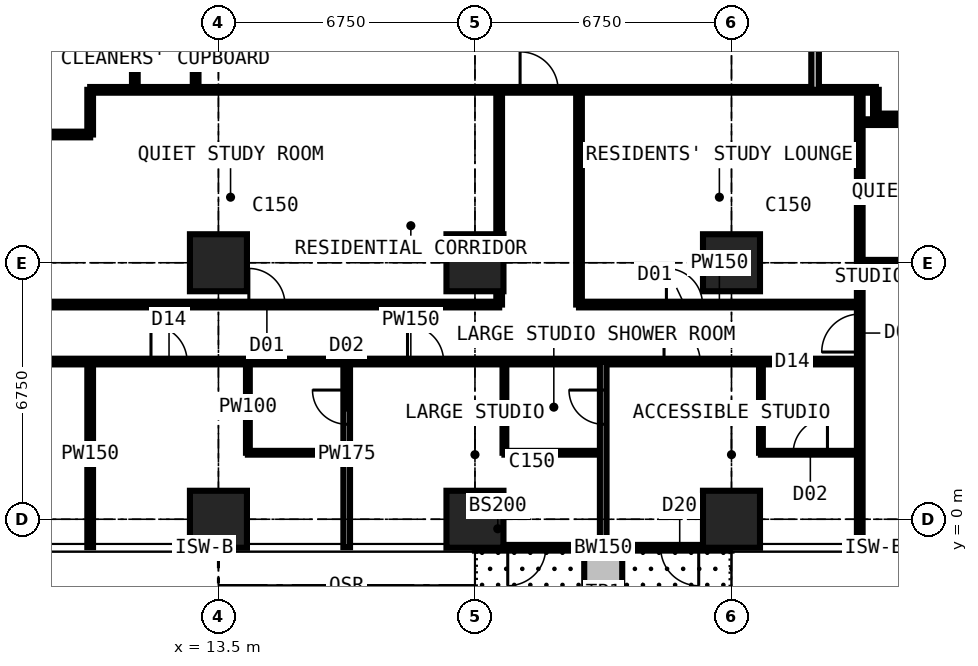
"""IFC4 building model, lengths in metres.
Left out: names, types, materials, properties, quantities, classifications, styles, units other than length and angle.
Written with IfcOpenShell. Run it as: python <this file> out.ifc"""

import sys

from ifc_helpers import new_model, si_unit, direction, frame, frame_2d, origin, origin_2d, place, context, subcontext, project, spatial, rectangle, extrude, element, fill, save


model = new_model("IFC4")
c1 = context("Model", 3, precision=1e-05, world=origin(), true_north=direction((0.0, 1.0)))
c2 = subcontext(c1, "Body", "Model", "MODEL_VIEW")
j1 = project(units=[si_unit("LENGTHUNIT", "METRE"), si_unit("PLANEANGLEUNIT", "RADIAN")], contexts=[c1])
p1 = place(None, origin())
s1 = spatial("IfcSite", under=j1, at=p1, CompositionType="ELEMENT")
p2 = place(p1, origin())
s2 = spatial("IfcBuilding", under=s1, at=p2, CompositionType="ELEMENT")
p3 = place(p2, frame((0.0, 0.0, 112.5)))
s3 = spatial("IfcBuildingStorey", under=s2, at=p3, CompositionType="ELEMENT", Elevation=112.5)
for number, where, z_axis, x_axis in (
    (1, (13.5, 0.0, 0.0), (0.0, 0.0, 1.0), (1.0, 0.0, 0.0)),
    (2, (13.5, 6.75, 0.0), (0.0, 0.0, 1.0), (1.0, 0.0, 0.0)),
    (3, (20.25, 0.0, 0.0), (0.0, 0.0, 1.0), (1.0, 0.0, 0.0)),
    (4, (20.25, 6.75, 0.0), (0.0, 0.0, 1.0), (1.0, 0.0, 0.0)),
    (5, (27.0, 0.0, 0.0), (0.0, 0.0, 1.0), (1.0, 0.0, 0.0)),
    (6, (27.0, 6.75, 0.0), (0.0, 0.0, 1.0), (1.0, 0.0, 0.0)),
):
    element("IfcColumn", number, at=place(p3, frame(where, z_axis=z_axis, x_axis=x_axis)), inside=s3, PredefinedType="COLUMN", context=c2, shape_type="SweptSolid", body=[
        extrude(rectangle(XDim=1.5, YDim=1.5, at=origin_2d()), origin(), (0.0, 0.0, 1.0), 3.6),
    ])
p4 = place(p3, frame((27.0, -0.75, 0.0), z_axis=(0.0, 0.0, 1.0), x_axis=(-1.0, 0.0, 0.0)))
e7 = element("IfcWall", 7, at=p4, inside=s3, PredefinedType="SOLIDWALL", context=c2, shape_type="SweptSolid", body=[
    extrude(rectangle(XDim=6.75, YDim=0.15, at=frame_2d((3.375, 0.0))), origin(), (0.0, 0.0, 1.0), 3.375),
])
p5 = place(p4, frame((0.863, 0.0, 0.0)))
e8 = element("IfcOpeningElement", 8, at=p5, cuts=e7, PredefinedType="OPENING", context=c2, shape_type="SweptSolid", body=[
    extrude(rectangle(XDim=1.0, YDim=2.2, at=frame_2d((0.5, 1.1))), frame((0.0, 0.085, 0.0), z_axis=(0.0, -1.0, 0.0), x_axis=(1.0, 0.0, 0.0)), (0.0, 0.0, 1.0), 0.17),
])
p6 = place(p4, frame((1.975, 0.0, 0.9)))
e9 = element("IfcOpeningElement", 9, at=p6, cuts=e7, PredefinedType="OPENING", context=c2, shape_type="SweptSolid", body=[
    extrude(rectangle(XDim=1.2, YDim=1.8, at=frame_2d((0.6, 0.9))), frame((0.0, 0.085, 0.0), z_axis=(0.0, -1.0, 0.0), x_axis=(1.0, 0.0, 0.0)), (0.0, 0.0, 1.0), 0.17),
])
p7 = place(p4, frame((4.887, 0.0, 0.0)))
e10 = element("IfcOpeningElement", 10, at=p7, cuts=e7, PredefinedType="OPENING", context=c2, shape_type="SweptSolid", body=[
    extrude(rectangle(XDim=1.0, YDim=2.2, at=frame_2d((0.5, 1.1))), frame((0.0, 0.085, 0.0), z_axis=(0.0, -1.0, 0.0), x_axis=(1.0, 0.0, 0.0)), (0.0, 0.0, 1.0), 0.17),
])
p8 = place(p4, frame((3.575, 0.0, 0.9)))
e11 = element("IfcOpeningElement", 11, at=p8, cuts=e7, PredefinedType="OPENING", context=c2, shape_type="SweptSolid", body=[
    extrude(rectangle(XDim=1.2, YDim=1.8, at=frame_2d((0.6, 0.9))), frame((0.0, 0.085, 0.0), z_axis=(0.0, -1.0, 0.0), x_axis=(1.0, 0.0, 0.0)), (0.0, 0.0, 1.0), 0.17),
])
p9 = place(p3, frame((23.625, -0.85, 0.0), z_axis=(0.0, 0.0, 1.0), x_axis=(0.0, -1.0, 0.0)))
e12 = element("IfcWall", 12, at=p9, inside=s3, PredefinedType="USERDEFINED", context=c2, shape_type="SweptSolid", body=[
    extrude(rectangle(XDim=2.2, YDim=1.0, at=frame_2d((1.1, 0.0))), origin(), (0.0, 0.0, 1.0), 0.9),
])
p10 = place(p3, frame((-0.734, 10.125, 0.0), z_axis=(0.0, 0.0, 1.0), x_axis=(1.0, 0.0, 0.0)))
e13 = element("IfcWall", 13, at=p10, inside=s3, PredefinedType="PARTITIONING", context=c2, shape_type="SweptSolid", body=[
    extrude(rectangle(XDim=10.859, YDim=0.15, at=frame_2d((5.429, 0.0))), origin(), (0.0, 0.0, 1.0), 3.375),
])
p11 = place(p3, frame((6.75, 4.15, 0.0), z_axis=(0.0, 0.0, 1.0), x_axis=(1.0, 0.0, 0.0)))
e14 = element("IfcWall", 14, at=p11, inside=s3, PredefinedType="PARTITIONING", context=c2, shape_type="SweptSolid", body=[
    extrude(rectangle(XDim=23.625, YDim=0.15, at=frame_2d((11.812, 0.0))), origin(), (0.0, 0.0, 1.0), 3.375),
])
p12 = place(p11, frame((1.2, 0.0, 0.0)))
e15 = element("IfcOpeningElement", 15, at=p12, cuts=e14, PredefinedType="OPENING", context=c2, shape_type="SweptSolid", body=[
    extrude(rectangle(XDim=1.0, YDim=2.2, at=frame_2d((0.5, 1.1))), frame((0.0, 0.085, 0.0), z_axis=(0.0, -1.0, 0.0), x_axis=(1.0, 0.0, 0.0)), (0.0, 0.0, 1.0), 0.17),
])
p13 = place(p11, frame((18.475, 0.0, 0.0)))
e16 = element("IfcOpeningElement", 16, at=p13, cuts=e14, PredefinedType="OPENING", context=c2, shape_type="SweptSolid", body=[
    extrude(rectangle(XDim=0.95, YDim=2.2, at=frame_2d((0.475, 1.1))), frame((0.0, 0.085, 0.0), z_axis=(0.0, -1.0, 0.0), x_axis=(1.0, 0.0, 0.0)), (0.0, 0.0, 1.0), 0.17),
])
p14 = place(p11, frame((11.725, 0.0, 0.0)))
e17 = element("IfcOpeningElement", 17, at=p14, cuts=e14, PredefinedType="OPENING", context=c2, shape_type="SweptSolid", body=[
    extrude(rectangle(XDim=0.95, YDim=2.2, at=frame_2d((0.475, 1.1))), frame((0.0, 0.085, 0.0), z_axis=(0.0, -1.0, 0.0), x_axis=(1.0, 0.0, 0.0)), (0.0, 0.0, 1.0), 0.17),
])
p15 = place(p11, frame((4.975, 0.0, 0.0)))
e18 = element("IfcOpeningElement", 18, at=p15, cuts=e14, PredefinedType="OPENING", context=c2, shape_type="SweptSolid", body=[
    extrude(rectangle(XDim=0.95, YDim=2.2, at=frame_2d((0.475, 1.1))), frame((0.0, 0.085, 0.0), z_axis=(0.0, -1.0, 0.0), x_axis=(1.0, 0.0, 0.0)), (0.0, 0.0, 1.0), 0.17),
])
p16 = place(p3, frame((6.75, 5.65, 0.0), z_axis=(0.0, 0.0, 1.0), x_axis=(1.0, 0.0, 0.0)))
e19 = element("IfcWall", 19, at=p16, inside=s3, PredefinedType="PARTITIONING", context=c2, shape_type="SweptSolid", body=[
    extrude(rectangle(XDim=14.137, YDim=0.15, at=frame_2d((7.069, 0.0))), origin(), (0.0, 0.0, 1.0), 3.375),
])
p17 = place(p16, frame((7.55, 0.0, 0.0)))
e20 = element("IfcOpeningElement", 20, at=p17, cuts=e19, PredefinedType="OPENING", context=c2, shape_type="SweptSolid", body=[
    extrude(rectangle(XDim=0.95, YDim=2.2, at=frame_2d((0.475, 1.1))), frame((0.0, 0.085, 0.0), z_axis=(0.0, -1.0, 0.0), x_axis=(1.0, 0.0, 0.0)), (0.0, 0.0, 1.0), 0.17),
])
p18 = place(p3, frame((10.125, -0.734, 0.0), z_axis=(0.0, 0.0, 1.0), x_axis=(0.0, 1.0, 0.0)))
e21 = element("IfcWall", 21, at=p18, inside=s3, PredefinedType="PARTITIONING", context=c2, shape_type="SweptSolid", body=[
    extrude(rectangle(XDim=4.884, YDim=0.15, at=frame_2d((2.442, 0.0))), origin(), (0.0, 0.0, 1.0), 3.375),
])
p19 = place(p3, frame((10.125, 10.125, 0.0), z_axis=(0.0, 0.0, 1.0), x_axis=(0.0, 1.0, 0.0)))
e22 = element("IfcWall", 22, at=p19, inside=s3, PredefinedType="PARTITIONING", context=c2, shape_type="SweptSolid", body=[
    extrude(rectangle(XDim=1.175, YDim=0.15, at=frame_2d((0.587, 0.0))), origin(), (0.0, 0.0, 1.0), 3.375),
])
p20 = place(p3, frame((10.125, 11.3, 0.0), z_axis=(0.0, 0.0, 1.0), x_axis=(1.0, 0.0, 0.0)))
e23 = element("IfcWall", 23, at=p20, inside=s3, PredefinedType="PARTITIONING", context=c2, shape_type="SweptSolid", body=[
    extrude(rectangle(XDim=20.675, YDim=0.15, at=frame_2d((10.337, 0.0))), origin(), (0.0, 0.0, 1.0), 3.375),
])
p21 = place(p20, frame((11.312, 0.0, 0.0)))
e24 = element("IfcOpeningElement", 24, at=p21, cuts=e23, PredefinedType="OPENING", context=c2, shape_type="SweptSolid", body=[
    extrude(rectangle(XDim=1.0, YDim=2.2, at=frame_2d((0.5, 1.1))), frame((0.0, 0.085, 0.0), z_axis=(0.0, -1.0, 0.0), x_axis=(1.0, 0.0, 0.0)), (0.0, 0.0, 1.0), 0.17),
])
p22 = place(p3, frame((11.3, 11.3, 0.0), z_axis=(0.0, 0.0, 1.0), x_axis=(0.0, 1.0, 0.0)))
e25 = element("IfcWall", 25, at=p22, inside=s3, PredefinedType="PARTITIONING", context=c2, shape_type="SweptSolid", body=[
    extrude(rectangle(XDim=19.3, YDim=0.15, at=frame_2d((9.65, 0.0))), origin(), (0.0, 0.0, 1.0), 3.375),
])
p23 = place(p22, frame((18.1, 0.0, 0.0)))
e26 = element("IfcOpeningElement", 26, at=p23, cuts=e25, PredefinedType="OPENING", context=c2, shape_type="SweptSolid", body=[
    extrude(rectangle(XDim=1.0, YDim=2.2, at=frame_2d((0.5, 1.1))), frame((0.0, 0.085, 0.0), z_axis=(0.0, -1.0, 0.0), x_axis=(1.0, 0.0, 0.0)), (0.0, 0.0, 1.0), 0.17),
])
p24 = place(p22, frame((10.137, 0.0, 0.0)))
e27 = element("IfcOpeningElement", 27, at=p24, cuts=e25, PredefinedType="OPENING", context=c2, shape_type="SweptSolid", body=[
    extrude(rectangle(XDim=1.0, YDim=2.2, at=frame_2d((0.5, 1.1))), frame((0.0, 0.085, 0.0), z_axis=(0.0, -1.0, 0.0), x_axis=(1.0, 0.0, 0.0)), (0.0, 0.0, 1.0), 0.17),
])
p25 = place(p3, frame((12.9, 11.3, 0.0), z_axis=(0.0, 0.0, 1.0), x_axis=(0.0, 1.0, 0.0)))
e28 = element("IfcWall", 28, at=p25, inside=s3, PredefinedType="PARTITIONING", context=c2, shape_type="SweptSolid", body=[
    extrude(rectangle(XDim=1.6, YDim=0.15, at=frame_2d((0.8, 0.0))), origin(), (0.0, 0.0, 1.0), 3.375),
])
p26 = place(p3, frame((14.275, 1.75, 0.0), z_axis=(0.0, 0.0, 1.0), x_axis=(0.0, 1.0, 0.0)))
e29 = element("IfcWall", 29, at=p26, inside=s3, PredefinedType="PARTITIONING", context=c2, shape_type="SweptSolid", body=[
    extrude(rectangle(XDim=2.4, YDim=0.1, at=frame_2d((1.2, 0.0))), origin(), (0.0, 0.0, 1.0), 3.375),
])
p27 = place(p3, frame((14.275, 1.75, 0.0), z_axis=(0.0, 0.0, 1.0), x_axis=(1.0, 0.0, 0.0)))
e30 = element("IfcWall", 30, at=p27, inside=s3, PredefinedType="PARTITIONING", context=c2, shape_type="SweptSolid", body=[
    extrude(rectangle(XDim=2.6, YDim=0.1, at=frame_2d((1.3, 0.0))), origin(), (0.0, 0.0, 1.0), 3.375),
])
p28 = place(p3, frame((16.875, -0.734, 0.0), z_axis=(0.0, 0.0, 1.0), x_axis=(0.0, 1.0, 0.0)))
e31 = element("IfcWall", 31, at=p28, inside=s3, PredefinedType="PARTITIONING", context=c2, shape_type="SweptSolid", body=[
    extrude(rectangle(XDim=4.884, YDim=0.175, at=frame_2d((2.442, 0.0))), origin(), (0.0, 0.0, 1.0), 3.375),
])
p29 = place(p28, frame((3.234, 0.0, 0.0)))
e32 = element("IfcOpeningElement", 32, at=p29, cuts=e31, PredefinedType="OPENING", context=c2, shape_type="SweptSolid", body=[
    extrude(rectangle(XDim=0.9, YDim=2.2, at=frame_2d((0.45, 1.1))), frame((0.0, 0.097, 0.0), z_axis=(0.0, -1.0, 0.0), x_axis=(1.0, 0.0, 0.0)), (0.0, 0.0, 1.0), 0.195),
])
p30 = place(p3, frame((20.887, 5.65, 0.0), z_axis=(0.0, 0.0, 1.0), x_axis=(0.0, 1.0, 0.0)))
e33 = element("IfcWall", 33, at=p30, inside=s3, PredefinedType="PARTITIONING", context=c2, shape_type="SweptSolid", body=[
    extrude(rectangle(XDim=5.65, YDim=0.15, at=frame_2d((2.825, 0.0))), origin(), (0.0, 0.0, 1.0), 3.375),
])
p31 = place(p3, frame((21.025, 1.75, 0.0), z_axis=(0.0, 0.0, 1.0), x_axis=(0.0, 1.0, 0.0)))
e34 = element("IfcWall", 34, at=p31, inside=s3, PredefinedType="PARTITIONING", context=c2, shape_type="SweptSolid", body=[
    extrude(rectangle(XDim=2.4, YDim=0.1, at=frame_2d((1.2, 0.0))), origin(), (0.0, 0.0, 1.0), 3.375),
])
p32 = place(p3, frame((21.025, 1.75, 0.0), z_axis=(0.0, 0.0, 1.0), x_axis=(1.0, 0.0, 0.0)))
e35 = element("IfcWall", 35, at=p32, inside=s3, PredefinedType="PARTITIONING", context=c2, shape_type="SweptSolid", body=[
    extrude(rectangle(XDim=2.6, YDim=0.1, at=frame_2d((1.3, 0.0))), origin(), (0.0, 0.0, 1.0), 3.375),
])
p33 = place(p3, frame((22.988, 5.65, 0.0), z_axis=(0.0, 0.0, 1.0), x_axis=(1.0, 0.0, 0.0)))
e36 = element("IfcWall", 36, at=p33, inside=s3, PredefinedType="PARTITIONING", context=c2, shape_type="SweptSolid", body=[
    extrude(rectangle(XDim=7.387, YDim=0.15, at=frame_2d((3.694, 0.0))), origin(), (0.0, 0.0, 1.0), 3.375),
])
p34 = place(p33, frame((2.3, 0.0, 0.0)))
e37 = element("IfcOpeningElement", 37, at=p34, cuts=e36, PredefinedType="OPENING", context=c2, shape_type="SweptSolid", body=[
    extrude(rectangle(XDim=0.95, YDim=2.2, at=frame_2d((0.475, 1.1))), frame((0.0, 0.085, 0.0), z_axis=(0.0, -1.0, 0.0), x_axis=(1.0, 0.0, 0.0)), (0.0, 0.0, 1.0), 0.17),
])
p35 = place(p3, frame((22.988, 5.65, 0.0), z_axis=(0.0, 0.0, 1.0), x_axis=(0.0, 1.0, 0.0)))
e38 = element("IfcWall", 38, at=p35, inside=s3, PredefinedType="PARTITIONING", context=c2, shape_type="SweptSolid", body=[
    extrude(rectangle(XDim=5.65, YDim=0.15, at=frame_2d((2.825, 0.0))), origin(), (0.0, 0.0, 1.0), 3.375),
])
p36 = place(p3, frame((23.625, -0.734, 0.0), z_axis=(0.0, 0.0, 1.0), x_axis=(0.0, 1.0, 0.0)))
e39 = element("IfcWall", 39, at=p36, inside=s3, PredefinedType="PARTITIONING", context=c2, shape_type="SweptSolid", body=[
    extrude(rectangle(XDim=4.884, YDim=0.175, at=frame_2d((2.442, 0.0))), origin(), (0.0, 0.0, 1.0), 3.375),
])
p37 = place(p36, frame((3.234, 0.0, 0.0)))
e40 = element("IfcOpeningElement", 40, at=p37, cuts=e39, PredefinedType="OPENING", context=c2, shape_type="SweptSolid", body=[
    extrude(rectangle(XDim=0.9, YDim=2.2, at=frame_2d((0.45, 1.1))), frame((0.0, 0.097, 0.0), z_axis=(0.0, -1.0, 0.0), x_axis=(1.0, 0.0, 0.0)), (0.0, 0.0, 1.0), 0.195),
])
p38 = place(p3, frame((27.775, 1.75, 0.0), z_axis=(0.0, 0.0, 1.0), x_axis=(0.0, 1.0, 0.0)))
e41 = element("IfcWall", 41, at=p38, inside=s3, PredefinedType="PARTITIONING", context=c2, shape_type="SweptSolid", body=[
    extrude(rectangle(XDim=2.4, YDim=0.1, at=frame_2d((1.2, 0.0))), origin(), (0.0, 0.0, 1.0), 3.375),
])
p39 = place(p3, frame((27.775, 1.75, 0.0), z_axis=(0.0, 0.0, 1.0), x_axis=(1.0, 0.0, 0.0)))
e42 = element("IfcWall", 42, at=p39, inside=s3, PredefinedType="PARTITIONING", context=c2, shape_type="SweptSolid", body=[
    extrude(rectangle(XDim=2.6, YDim=0.1, at=frame_2d((1.3, 0.0))), origin(), (0.0, 0.0, 1.0), 3.375),
])
p40 = place(p39, frame((0.85, 0.0, 0.0)))
e43 = element("IfcOpeningElement", 43, at=p40, cuts=e42, PredefinedType="OPENING", context=c2, shape_type="SweptSolid", body=[
    extrude(rectangle(XDim=0.9, YDim=2.2, at=frame_2d((0.45, 1.1))), frame((0.0, 0.06, 0.0), z_axis=(0.0, -1.0, 0.0), x_axis=(1.0, 0.0, 0.0)), (0.0, 0.0, 1.0), 0.12),
])
p41 = place(p3, frame((29.2, 11.3, 0.0), z_axis=(0.0, 0.0, 1.0), x_axis=(0.0, 1.0, 0.0)))
e44 = element("IfcWall", 44, at=p41, inside=s3, PredefinedType="PARTITIONING", context=c2, shape_type="SweptSolid", body=[
    extrude(rectangle(XDim=17.9, YDim=0.2, at=frame_2d((8.95, 0.0))), origin(), (0.0, 0.0, 1.0), 3.375),
])
p42 = place(p41, frame((8.35, 0.0, 0.0)))
e45 = element("IfcOpeningElement", 45, at=p42, cuts=e44, PredefinedType="OPENING", context=c2, shape_type="SweptSolid", body=[
    extrude(rectangle(XDim=1.2, YDim=2.2, at=frame_2d((0.6, 1.1))), frame((0.0, 0.11, 0.0), z_axis=(0.0, -1.0, 0.0), x_axis=(1.0, 0.0, 0.0)), (0.0, 0.0, 1.0), 0.22),
])
p43 = place(p3, frame((30.375, -0.734, 0.0), z_axis=(0.0, 0.0, 1.0), x_axis=(0.0, 1.0, 0.0)))
e46 = element("IfcWall", 46, at=p43, inside=s3, PredefinedType="PARTITIONING", context=c2, shape_type="SweptSolid", body=[
    extrude(rectangle(XDim=12.034, YDim=0.15, at=frame_2d((6.017, 0.0))), origin(), (0.0, 0.0, 1.0), 3.375),
])
p44 = place(p43, frame((5.134, 0.0, 0.0)))
e47 = element("IfcOpeningElement", 47, at=p44, cuts=e46, PredefinedType="OPENING", context=c2, shape_type="SweptSolid", body=[
    extrude(rectangle(XDim=1.0, YDim=2.2, at=frame_2d((0.5, 1.1))), frame((0.0, 0.085, 0.0), z_axis=(0.0, -1.0, 0.0), x_axis=(1.0, 0.0, 0.0)), (0.0, 0.0, 1.0), 0.17),
])
p45 = place(p3, frame((30.375, 6.75, 0.0), z_axis=(0.0, 0.0, 1.0), x_axis=(1.0, 0.0, 0.0)))
e48 = element("IfcWall", 48, at=p45, inside=s3, PredefinedType="PARTITIONING", context=c2, shape_type="SweptSolid", body=[
    extrude(rectangle(XDim=5.975, YDim=0.15, at=frame_2d((2.988, 0.0))), origin(), (0.0, 0.0, 1.0), 2.877),
])
p46 = place(p3, frame((30.375, 10.45, 0.0), z_axis=(0.0, 0.0, 1.0), x_axis=(1.0, 0.0, 0.0)))
e49 = element("IfcWall", 49, at=p46, inside=s3, PredefinedType="PARTITIONING", context=c2, shape_type="SweptSolid", body=[
    extrude(rectangle(XDim=4.475, YDim=0.15, at=frame_2d((2.238, 0.0))), origin(), (0.0, 0.0, 1.0), 3.375),
])
p47 = place(p46, frame((2.35, 0.0, 0.0)))
e50 = element("IfcOpeningElement", 50, at=p47, cuts=e49, PredefinedType="OPENING", context=c2, shape_type="SweptSolid", body=[
    extrude(rectangle(XDim=0.95, YDim=2.2, at=frame_2d((0.475, 1.1))), frame((0.0, 0.085, 0.0), z_axis=(0.0, -1.0, 0.0), x_axis=(1.0, 0.0, 0.0)), (0.0, 0.0, 1.0), 0.17),
])
p48 = place(p3, frame((30.8, 10.6, 0.0), z_axis=(0.0, 0.0, 1.0), x_axis=(0.0, 1.0, 0.0)))
e51 = element("IfcWall", 51, at=p48, inside=s3, PredefinedType="PARTITIONING", context=c2, shape_type="SweptSolid", body=[
    extrude(rectangle(XDim=0.7, YDim=0.15, at=frame_2d((0.35, 0.0))), origin(), (0.0, 0.0, 1.0), 3.375),
])
p49 = place(p3, frame((30.8, 10.6, 0.0), z_axis=(0.0, 0.0, 1.0), x_axis=(1.0, 0.0, 0.0)))
e52 = element("IfcWall", 52, at=p49, inside=s3, PredefinedType="PARTITIONING", context=c2, shape_type="SweptSolid", body=[
    extrude(rectangle(XDim=1.85, YDim=0.15, at=frame_2d((0.925, 0.0))), origin(), (0.0, 0.0, 1.0), 3.375),
])
p50 = place(p5, origin())
e53 = element("IfcDoor", 53, at=p50, inside=s3, OperationType="SINGLE_SWING_LEFT", PredefinedType="DOOR", context=c2, shape_type="SweptSolid", body=[
    extrude(rectangle(XDim=1.0, YDim=2.2, at=frame_2d((0.5, 1.1))), frame((0.0, 0.025, 0.0), z_axis=(0.0, -1.0, 0.0), x_axis=(1.0, 0.0, 0.0)), (0.0, 0.0, 1.0), 0.05),
])
fill(e8, e53)
p51 = place(p6, origin())
e54 = element("IfcWindow", 54, at=p51, inside=s3, PartitioningType="SINGLE_PANEL", PredefinedType="WINDOW", context=c2, shape_type="SweptSolid", body=[
    extrude(rectangle(XDim=1.2, YDim=1.8, at=frame_2d((0.6, 0.9))), frame((0.0, 0.03, 0.0), z_axis=(0.0, -1.0, 0.0), x_axis=(1.0, 0.0, 0.0)), (0.0, 0.0, 1.0), 0.06),
])
fill(e9, e54)
p52 = place(p7, origin())
e55 = element("IfcDoor", 55, at=p52, inside=s3, OperationType="SINGLE_SWING_RIGHT", PredefinedType="DOOR", context=c2, shape_type="SweptSolid", body=[
    extrude(rectangle(XDim=1.0, YDim=2.2, at=frame_2d((0.5, 1.1))), frame((0.0, 0.025, 0.0), z_axis=(0.0, -1.0, 0.0), x_axis=(1.0, 0.0, 0.0)), (0.0, 0.0, 1.0), 0.05),
])
fill(e10, e55)
p53 = place(p8, origin())
e56 = element("IfcWindow", 56, at=p53, inside=s3, PartitioningType="SINGLE_PANEL", PredefinedType="WINDOW", context=c2, shape_type="SweptSolid", body=[
    extrude(rectangle(XDim=1.2, YDim=1.8, at=frame_2d((0.6, 0.9))), frame((0.0, 0.03, 0.0), z_axis=(0.0, -1.0, 0.0), x_axis=(1.0, 0.0, 0.0)), (0.0, 0.0, 1.0), 0.06),
])
fill(e11, e56)
p54 = place(p13, origin())
e57 = element("IfcDoor", 57, at=p54, inside=s3, OperationType="SINGLE_SWING_LEFT", PredefinedType="DOOR", context=c2, shape_type="SweptSolid", body=[
    extrude(rectangle(XDim=0.95, YDim=2.2, at=frame_2d((0.475, 1.1))), frame((0.0, 0.025, 0.0), z_axis=(0.0, -1.0, 0.0), x_axis=(1.0, 0.0, 0.0)), (0.0, 0.0, 1.0), 0.05),
])
fill(e16, e57)
p55 = place(p40, origin())
e58 = element("IfcDoor", 58, at=p55, inside=s3, OperationType="SINGLE_SWING_RIGHT", PredefinedType="DOOR", context=c2, shape_type="SweptSolid", body=[
    extrude(rectangle(XDim=0.9, YDim=2.2, at=frame_2d((0.45, 1.1))), frame((0.0, 0.025, 0.0), z_axis=(0.0, -1.0, 0.0), x_axis=(1.0, 0.0, 0.0)), (0.0, 0.0, 1.0), 0.05),
])
fill(e43, e58)
p56 = place(p14, origin())
e59 = element("IfcDoor", 59, at=p56, inside=s3, OperationType="SINGLE_SWING_LEFT", PredefinedType="DOOR", context=c2, shape_type="SweptSolid", body=[
    extrude(rectangle(XDim=0.95, YDim=2.2, at=frame_2d((0.475, 1.1))), frame((0.0, 0.025, 0.0), z_axis=(0.0, -1.0, 0.0), x_axis=(1.0, 0.0, 0.0)), (0.0, 0.0, 1.0), 0.05),
])
fill(e17, e59)
p57 = place(p37, origin())
e60 = element("IfcDoor", 60, at=p57, inside=s3, OperationType="SINGLE_SWING_RIGHT", PredefinedType="DOOR", context=c2, shape_type="SweptSolid", body=[
    extrude(rectangle(XDim=0.9, YDim=2.2, at=frame_2d((0.45, 1.1))), frame((0.0, 0.025, 0.0), z_axis=(0.0, -1.0, 0.0), x_axis=(1.0, 0.0, 0.0)), (0.0, 0.0, 1.0), 0.05),
])
fill(e40, e60)
p58 = place(p15, origin())
e61 = element("IfcDoor", 61, at=p58, inside=s3, OperationType="SINGLE_SWING_LEFT", PredefinedType="DOOR", context=c2, shape_type="SweptSolid", body=[
    extrude(rectangle(XDim=0.95, YDim=2.2, at=frame_2d((0.475, 1.1))), frame((0.0, 0.025, 0.0), z_axis=(0.0, -1.0, 0.0), x_axis=(1.0, 0.0, 0.0)), (0.0, 0.0, 1.0), 0.05),
])
fill(e18, e61)
p59 = place(p29, origin())
e62 = element("IfcDoor", 62, at=p59, inside=s3, OperationType="SINGLE_SWING_RIGHT", PredefinedType="DOOR", context=c2, shape_type="SweptSolid", body=[
    extrude(rectangle(XDim=0.9, YDim=2.2, at=frame_2d((0.45, 1.1))), frame((0.0, 0.025, 0.0), z_axis=(0.0, -1.0, 0.0), x_axis=(1.0, 0.0, 0.0)), (0.0, 0.0, 1.0), 0.05),
])
fill(e32, e62)
p60 = place(p21, origin())
e63 = element("IfcDoor", 63, at=p60, inside=s3, OperationType="SINGLE_SWING_LEFT", PredefinedType="DOOR", context=c2, shape_type="SweptSolid", body=[
    extrude(rectangle(XDim=1.0, YDim=2.2, at=frame_2d((0.5, 1.1))), frame((0.0, 0.025, 0.0), z_axis=(0.0, -1.0, 0.0), x_axis=(1.0, 0.0, 0.0)), (0.0, 0.0, 1.0), 0.05),
])
fill(e24, e63)
p61 = place(p34, origin())
e64 = element("IfcDoor", 64, at=p61, inside=s3, OperationType="SINGLE_SWING_LEFT", PredefinedType="DOOR", context=c2, shape_type="SweptSolid", body=[
    extrude(rectangle(XDim=0.95, YDim=2.2, at=frame_2d((0.475, 1.1))), frame((0.0, 0.025, 0.0), z_axis=(0.0, -1.0, 0.0), x_axis=(1.0, 0.0, 0.0)), (0.0, 0.0, 1.0), 0.05),
])
fill(e37, e64)
p62 = place(p17, origin())
e65 = element("IfcDoor", 65, at=p62, inside=s3, OperationType="SINGLE_SWING_LEFT", PredefinedType="DOOR", context=c2, shape_type="SweptSolid", body=[
    extrude(rectangle(XDim=0.95, YDim=2.2, at=frame_2d((0.475, 1.1))), frame((0.0, 0.025, 0.0), z_axis=(0.0, -1.0, 0.0), x_axis=(1.0, 0.0, 0.0)), (0.0, 0.0, 1.0), 0.05),
])
fill(e20, e65)
p63 = place(p44, origin())
e66 = element("IfcDoor", 66, at=p63, inside=s3, OperationType="SINGLE_SWING_LEFT", PredefinedType="DOOR", context=c2, shape_type="SweptSolid", body=[
    extrude(rectangle(XDim=1.0, YDim=2.2, at=frame_2d((0.5, 1.1))), frame((0.0, 0.025, 0.0), z_axis=(0.0, -1.0, 0.0), x_axis=(1.0, 0.0, 0.0)), (0.0, 0.0, 1.0), 0.05),
])
fill(e47, e66)
save(model, sys.argv[1])
